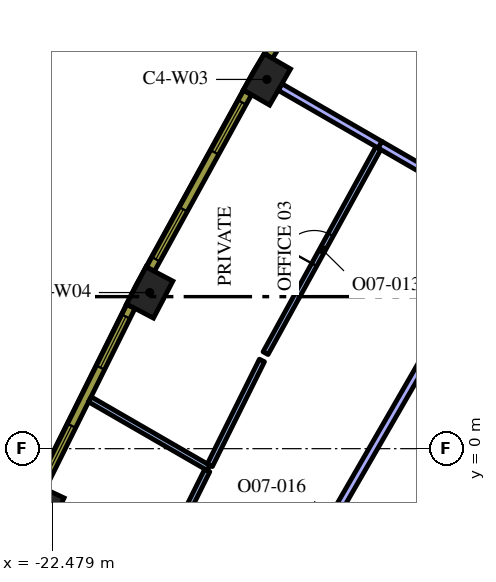
"""IFC4 building model, lengths in metres.
Left out: names, types, materials, properties, quantities, classifications, styles, units other than length and angle.
Written with IfcOpenShell. Run it as: python <this file> out.ifc"""

import sys

from ifc_helpers import new_model, si_unit, direction, frame, frame_2d, origin, origin_2d, place, context, subcontext, project, spatial, rectangle, extrude, element, fill, save


model = new_model("IFC4")
c1 = context("Model", 3, precision=1e-05, world=origin(), true_north=direction((0.0, 1.0)))
c2 = subcontext(c1, "Body", "Model", "MODEL_VIEW")
j1 = project(units=[si_unit("LENGTHUNIT", "METRE"), si_unit("PLANEANGLEUNIT", "RADIAN")], contexts=[c1])
p1 = place(None, origin())
s1 = spatial("IfcSite", under=j1, at=p1, CompositionType="ELEMENT")
p2 = place(p1, origin())
s2 = spatial("IfcBuilding", under=s1, at=p2, CompositionType="ELEMENT")
p3 = place(p2, frame((0.0, 0.0, 214.2)))
s3 = spatial("IfcBuildingStorey", under=s2, at=p3, CompositionType="ELEMENT", Elevation=214.2)
for number, where, z_axis, x_axis in (
    (1, (-16.827, 9.715, 0.0), (0.0, 0.0, 1.0), (-0.5, -0.866, 0.0)),
    (2, (-19.912, 4.108, 0.0), (0.0, 0.0, 1.0), (-0.464, -0.886, 0.0)),
    (3, (-22.76, -1.623, 0.0), (0.0, 0.0, 1.0), (-0.426, -0.905, 0.0)),
):
    element("IfcColumn", number, at=place(p3, frame(where, z_axis=z_axis, x_axis=x_axis)), inside=s3, PredefinedType="COLUMN", context=c2, shape_type="SweptSolid", body=[
        extrude(rectangle(XDim=1.1, YDim=0.8, at=origin_2d()), origin(), (0.0, 0.0, 1.0), 4.2),
    ])
p4 = place(p3, frame((-15.321, -6.537, 0.0), z_axis=(0.0, 0.0, 1.0), x_axis=(0.500000268222, 0.866025248926, 0.0)))
e4 = element("IfcWall", 4, at=p4, inside=s3, PredefinedType="SOLIDWALL", context=c2, shape_type="SweptSolid", body=[
    extrude(rectangle(XDim=8.038, YDim=0.7, at=frame_2d((4.019, 0.0))), origin(), (0.0, 0.0, 1.0), 4.2),
])
p5 = place(p3, frame((-13.844, 7.993, 0.0), z_axis=(0.0, 0.0, 1.0), x_axis=(-0.866003976688, 0.500037110984, 0.0)))
e5 = element("IfcWall", 5, at=p5, inside=s3, PredefinedType="PARTITIONING", context=c2, shape_type="SweptSolid", body=[
    extrude(rectangle(XDim=3.045, YDim=0.2, at=frame_2d((1.522, 0.0))), origin(), (0.0, 0.0, 1.0), 3.45),
])
p6 = place(p3, frame((-10.522, 6.075, 0.0), z_axis=(0.0, 0.0, 1.0), x_axis=(-0.866002601515, 0.500039492609, 0.0)))
e6 = element("IfcWall", 6, at=p6, inside=s3, PredefinedType="PARTITIONING", context=c2, shape_type="SweptSolid", body=[
    extrude(rectangle(XDim=3.844, YDim=0.2, at=frame_2d((1.922, 0.0))), origin(), (0.0, 0.0, 1.0), 3.45),
])
p7 = place(p3, frame((-18.363, -0.506, 0.0), z_axis=(0.0, 0.0, 1.0), x_axis=(-0.866048087663, 0.499960708312, 0.0)))
e7 = element("IfcWall", 7, at=p7, inside=s3, PredefinedType="PARTITIONING", context=c2, shape_type="SweptSolid", body=[
    extrude(rectangle(XDim=3.607, YDim=0.15, at=frame_2d((1.804, 0.0))), origin(), (0.0, 0.0, 1.0), 3.45),
])
p8 = place(p3, frame((-16.863, 2.513, 0.0), z_axis=(0.0, 0.0, 1.0), x_axis=(0.48192483879, 0.876212559689, 0.0)))
e8 = element("IfcWall", 8, at=p8, inside=s3, PredefinedType="PARTITIONING", context=c2, shape_type="SweptSolid", body=[
    extrude(rectangle(XDim=6.157, YDim=0.15, at=frame_2d((3.078, 0.0))), origin(), (0.0, 0.0, 1.0), 3.45),
])
p9 = place(p8, frame((2.657, 0.0, 0.0)))
e9 = element("IfcOpeningElement", 9, at=p9, cuts=e8, PredefinedType="OPENING", context=c2, shape_type="SweptSolid", body=[
    extrude(rectangle(XDim=0.9, YDim=2.1, at=frame_2d((0.45, 1.05))), frame((0.0, 0.085, 0.0), z_axis=(0.0, -1.0, 0.0), x_axis=(1.0, 0.0, 0.0)), (0.0, 0.0, 1.0), 0.17),
])
p10 = place(p3, frame((-16.958, 2.321, 0.0), z_axis=(0.0, 0.0, 1.0), x_axis=(-0.445184199442, -0.895439014432, 0.0)))
e10 = element("IfcWall", 10, at=p10, inside=s3, PredefinedType="PARTITIONING", context=c2, shape_type="SweptSolid", body=[
    extrude(rectangle(XDim=3.082, YDim=0.15, at=frame_2d((1.541, 0.0))), origin(), (0.0, 0.0, 1.0), 3.45),
])
p11 = place(p3, frame((-18.397, -0.573, 0.0), z_axis=(0.0, 0.0, 1.0), x_axis=(-0.445162501923, -0.89544980143, 0.0)))
e11 = element("IfcWall", 11, at=p11, inside=s3, PredefinedType="PARTITIONING", context=c2, shape_type="SweptSolid", body=[
    extrude(rectangle(XDim=2.811, YDim=0.15, at=frame_2d((1.405, 0.0))), origin(), (0.0, 0.0, 1.0), 3.45),
])
p12 = place(p3, frame((-12.537, 2.585, 0.0), z_axis=(0.0, 0.0, 1.0), x_axis=(-0.500002393198, -0.866024022066, 0.0)))
e12 = element("IfcWall", 12, at=p12, inside=s3, PredefinedType="PARTITIONING", context=c2, shape_type="SweptSolid", body=[
    extrude(rectangle(XDim=10.317, YDim=0.2, at=frame_2d((5.159, 0.0))), origin(), (0.0, 0.0, 1.0), 3.45),
])
p13 = place(p12, frame((4.7, 0.0, 0.0)))
e13 = element("IfcOpeningElement", 13, at=p13, cuts=e12, PredefinedType="OPENING", context=c2, shape_type="SweptSolid", body=[
    extrude(rectangle(XDim=1.0, YDim=2.1, at=frame_2d((0.5, 1.05))), frame((0.0, 0.11, 0.0), z_axis=(0.0, -1.0, 0.0), x_axis=(1.0, 0.0, 0.0)), (0.0, 0.0, 1.0), 0.22),
])
p14 = place(p3, frame((-14.038, 14.864, 0.0), z_axis=(0.0, 0.0, 1.0), x_axis=(-0.517846166225, -0.855473756538, 0.0)))
e14 = element("IfcWall", 14, at=p14, inside=s3, PredefinedType="SOLIDWALL", context=c2, shape_type="SweptSolid", body=[
    extrude(rectangle(XDim=5.298, YDim=0.24, at=frame_2d((2.649, 0.0))), origin(), (0.0, 0.0, 1.0), 3.95),
])
p15 = place(p14, frame((0.294, 0.0, 0.9)))
e15 = element("IfcOpeningElement", 15, at=p15, cuts=e14, PredefinedType="OPENING", context=c2, shape_type="SweptSolid", body=[
    extrude(rectangle(XDim=1.5, YDim=2.55, at=frame_2d((0.75, 1.275))), frame((0.0, 0.13, 0.0), z_axis=(0.0, -1.0, 0.0), x_axis=(1.0, 0.0, 0.0)), (0.0, 0.0, 1.0), 0.26),
])
p16 = place(p14, frame((3.504, 0.0, 0.9)))
e16 = element("IfcOpeningElement", 16, at=p16, cuts=e14, PredefinedType="OPENING", context=c2, shape_type="SweptSolid", body=[
    extrude(rectangle(XDim=1.5, YDim=2.55, at=frame_2d((0.75, 1.275))), frame((0.0, 0.13, 0.0), z_axis=(0.0, -1.0, 0.0), x_axis=(1.0, 0.0, 0.0)), (0.0, 0.0, 1.0), 0.26),
])
p17 = place(p3, frame((-17.338, 9.368, 0.0), z_axis=(0.0, 0.0, 1.0), x_axis=(-0.481925825015, -0.876212017256, 0.0)))
e17 = element("IfcWall", 17, at=p17, inside=s3, PredefinedType="SOLIDWALL", context=c2, shape_type="SweptSolid", body=[
    extrude(rectangle(XDim=5.299, YDim=0.24, at=frame_2d((2.649, 0.0))), origin(), (0.0, 0.0, 1.0), 3.95),
])
p18 = place(p17, frame((0.295, 0.0, 0.9)))
e18 = element("IfcOpeningElement", 18, at=p18, cuts=e17, PredefinedType="OPENING", context=c2, shape_type="SweptSolid", body=[
    extrude(rectangle(XDim=1.5, YDim=2.55, at=frame_2d((0.75, 1.275))), frame((0.0, 0.13, 0.0), z_axis=(0.0, -1.0, 0.0), x_axis=(1.0, 0.0, 0.0)), (0.0, 0.0, 1.0), 0.26),
])
p19 = place(p17, frame((3.504, 0.0, 0.9)))
e19 = element("IfcOpeningElement", 19, at=p19, cuts=e17, PredefinedType="OPENING", context=c2, shape_type="SweptSolid", body=[
    extrude(rectangle(XDim=1.5, YDim=2.55, at=frame_2d((0.75, 1.275))), frame((0.0, 0.13, 0.0), z_axis=(0.0, -1.0, 0.0), x_axis=(1.0, 0.0, 0.0)), (0.0, 0.0, 1.0), 0.26),
])
p20 = place(p3, frame((-20.407, 3.74, 0.0), z_axis=(0.0, 0.0, 1.0), x_axis=(-0.445129582031, -0.895466166419, 0.0)))
e20 = element("IfcWall", 20, at=p20, inside=s3, PredefinedType="SOLIDWALL", context=c2, shape_type="SweptSolid", body=[
    extrude(rectangle(XDim=5.298, YDim=0.24, at=frame_2d((2.649, 0.0))), origin(), (0.0, 0.0, 1.0), 3.95),
])
p21 = place(p20, frame((0.295, 0.0, 0.9)))
e21 = element("IfcOpeningElement", 21, at=p21, cuts=e20, PredefinedType="OPENING", context=c2, shape_type="SweptSolid", body=[
    extrude(rectangle(XDim=1.5, YDim=2.55, at=frame_2d((0.75, 1.275))), frame((0.0, 0.13, 0.0), z_axis=(0.0, -1.0, 0.0), x_axis=(1.0, 0.0, 0.0)), (0.0, 0.0, 1.0), 0.26),
])
p22 = place(p20, frame((3.504, 0.0, 0.9)))
e22 = element("IfcOpeningElement", 22, at=p22, cuts=e20, PredefinedType="OPENING", context=c2, shape_type="SweptSolid", body=[
    extrude(rectangle(XDim=1.5, YDim=2.55, at=frame_2d((0.75, 1.275))), frame((0.0, 0.13, 0.0), z_axis=(0.0, -1.0, 0.0), x_axis=(1.0, 0.0, 0.0)), (0.0, 0.0, 1.0), 0.26),
])
p23 = place(p9, origin())
e23 = element("IfcDoor", 23, at=p23, inside=s3, OperationType="SINGLE_SWING_RIGHT", PredefinedType="DOOR", context=c2, shape_type="SweptSolid", body=[
    extrude(rectangle(XDim=0.9, YDim=2.1, at=frame_2d((0.45, 1.05))), frame((0.0, 0.025, 0.0), z_axis=(0.0, -1.0, 0.0), x_axis=(1.0, 0.0, 0.0)), (0.0, 0.0, 1.0), 0.05),
])
fill(e9, e23)
p24 = place(p18, origin())
e24 = element("IfcWindow", 24, at=p24, inside=s3, PartitioningType="SINGLE_PANEL", PredefinedType="WINDOW", context=c2, shape_type="SweptSolid", body=[
    extrude(rectangle(XDim=1.5, YDim=2.55, at=frame_2d((0.75, 1.275))), frame((0.0, 0.04, 0.0), z_axis=(0.0, -1.0, 0.0), x_axis=(1.0, 0.0, 0.0)), (0.0, 0.0, 1.0), 0.06),
])
fill(e18, e24)
p25 = place(p19, origin())
e25 = element("IfcWindow", 25, at=p25, inside=s3, PartitioningType="SINGLE_PANEL", PredefinedType="WINDOW", context=c2, shape_type="SweptSolid", body=[
    extrude(rectangle(XDim=1.5, YDim=2.55, at=frame_2d((0.75, 1.275))), frame((0.0, 0.04, 0.0), z_axis=(0.0, -1.0, 0.0), x_axis=(1.0, 0.0, 0.0)), (0.0, 0.0, 1.0), 0.06),
])
fill(e19, e25)
p26 = place(p21, origin())
e26 = element("IfcWindow", 26, at=p26, inside=s3, PartitioningType="SINGLE_PANEL", PredefinedType="WINDOW", context=c2, shape_type="SweptSolid", body=[
    extrude(rectangle(XDim=1.5, YDim=2.55, at=frame_2d((0.75, 1.275))), frame((0.0, 0.04, 0.0), z_axis=(0.0, -1.0, 0.0), x_axis=(1.0, 0.0, 0.0)), (0.0, 0.0, 1.0), 0.06),
])
fill(e21, e26)
p27 = place(p22, origin())
e27 = element("IfcWindow", 27, at=p27, inside=s3, PartitioningType="SINGLE_PANEL", PredefinedType="WINDOW", context=c2, shape_type="SweptSolid", body=[
    extrude(rectangle(XDim=1.5, YDim=2.55, at=frame_2d((0.75, 1.275))), frame((0.0, 0.04, 0.0), z_axis=(0.0, -1.0, 0.0), x_axis=(1.0, 0.0, 0.0)), (0.0, 0.0, 1.0), 0.06),
])
fill(e22, e27)
save(model, sys.argv[1])
